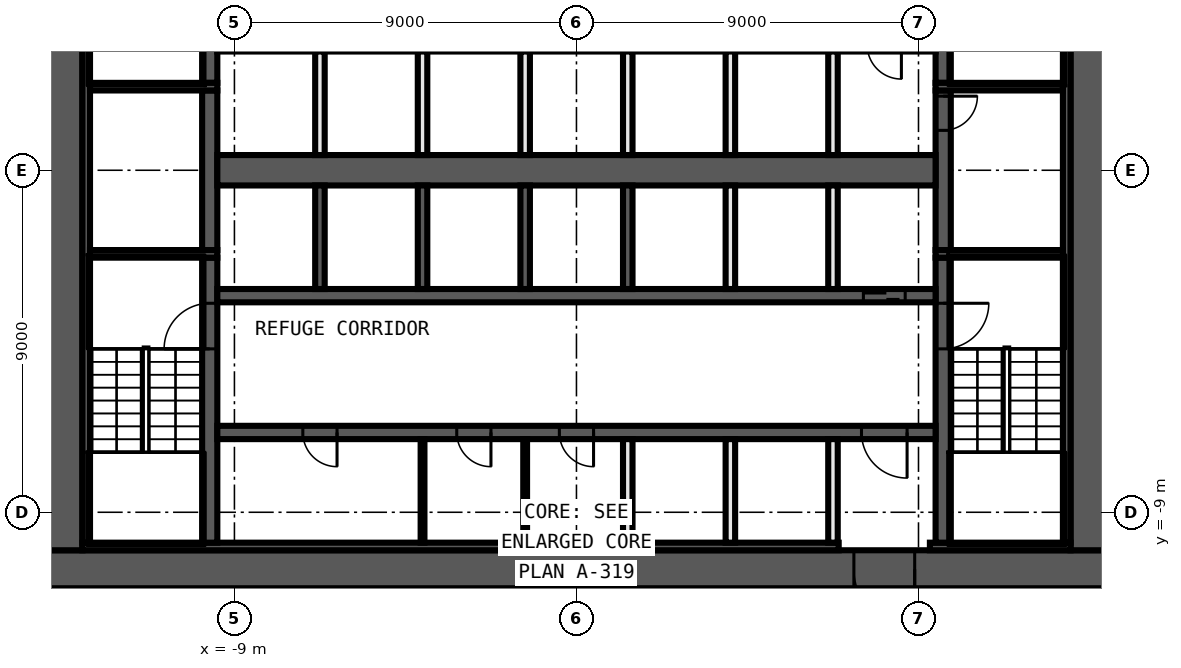
"""IFC4 building model, lengths in metres.
Left out: names, types, materials, properties, quantities, classifications, styles, units other than length and angle.
Written with IfcOpenShell. Run it as: python <this file> out.ifc"""

import sys

from ifc_helpers import new_model, si_unit, direction, frame, frame_2d, origin, place, context, subcontext, project, spatial, rectangle, extrude, element, fill, save


model = new_model("IFC4")
c1 = context("Model", 3, precision=1e-05, world=origin(), true_north=direction((0.0, 1.0)))
c2 = subcontext(c1, "Body", "Model", "MODEL_VIEW")
j1 = project(units=[si_unit("LENGTHUNIT", "METRE"), si_unit("PLANEANGLEUNIT", "RADIAN")], contexts=[c1])
p1 = place(None, origin())
s1 = spatial("IfcSite", under=j1, at=p1, CompositionType="ELEMENT")
p2 = place(p1, origin())
s2 = spatial("IfcBuilding", under=s1, at=p2, CompositionType="ELEMENT")
p3 = place(p2, frame((0.0, 0.0, 145.6)))
s3 = spatial("IfcBuildingStorey", under=s2, at=p3, CompositionType="ELEMENT", Elevation=145.6)
p4 = place(p3, frame((14.0, -10.5, 0.0), z_axis=(0.0, 0.0, 1.0), x_axis=(-1.0, 0.0, 0.0)))
e1 = element("IfcWall", 1, at=p4, inside=s3, PredefinedType="SHEAR", context=c2, shape_type="SweptSolid", body=[
    extrude(rectangle(XDim=28.0, YDim=1.0, at=frame_2d((14.0, 0.0))), origin(), (0.0, 0.0, 1.0), 5.55),
])
p5 = place(p4, frame((5.1, 0.0, 0.0)))
e2 = element("IfcOpeningElement", 2, at=p5, cuts=e1, PredefinedType="OPENING", context=c2, shape_type="SweptSolid", body=[
    extrude(rectangle(XDim=1.6, YDim=2.1, at=frame_2d((0.8, 1.05))), frame((0.0, 0.51, 0.0), z_axis=(0.0, -1.0, 0.0), x_axis=(1.0, 0.0, 0.0)), (0.0, 0.0, 1.0), 1.02),
])
for number, where, z_axis, x_axis in (
    (3, (13.5, 10.0, 0.0), (0.0, 0.0, 1.0), (0.0, -1.0, 0.0)),
    (4, (-13.5, -10.0, 0.0), (0.0, 0.0, 1.0), (0.0, 1.0, 0.0)),
):
    element("IfcWall", number, at=place(p3, frame(where, z_axis=z_axis, x_axis=x_axis)), inside=s3, PredefinedType="SHEAR", context=c2, shape_type="SweptSolid", body=[
        extrude(rectangle(XDim=20.0, YDim=1.0, at=frame_2d((10.0, 0.0))), origin(), (0.0, 0.0, 1.0), 5.55),
    ])
p6 = place(p3, frame((13.0, -9.9, 0.0), z_axis=(0.0, 0.0, 1.0), x_axis=(-1.0, 0.0, 0.0)))
e5 = element("IfcWall", 5, at=p6, inside=s3, PredefinedType="SHEAR", context=c2, shape_type="SweptSolid", body=[
    extrude(rectangle(XDim=3.7, YDim=0.2, at=frame_2d((1.85, 0.0))), origin(), (0.0, 0.0, 1.0), 5.55),
])
p7 = place(p3, frame((6.9, -9.9, 0.0), z_axis=(0.0, 0.0, 1.0), x_axis=(-1.0, 0.0, 0.0)))
e6 = element("IfcWall", 6, at=p7, inside=s3, PredefinedType="SHEAR", context=c2, shape_type="SweptSolid", body=[
    extrude(rectangle(XDim=19.9, YDim=0.2, at=frame_2d((9.95, 0.0))), origin(), (0.0, 0.0, 1.0), 5.55),
])
for number, where, z_axis, x_axis in (
    (7, (12.9, 9.8, 0.0), (0.0, 0.0, 1.0), (0.0, -1.0, 0.0)),
    (8, (-12.9, -9.8, 0.0), (0.0, 0.0, 1.0), (0.0, 1.0, 0.0)),
):
    element("IfcWall", number, at=place(p3, frame(where, z_axis=z_axis, x_axis=x_axis)), inside=s3, PredefinedType="SHEAR", context=c2, shape_type="SweptSolid", body=[
        extrude(rectangle(XDim=19.6, YDim=0.2, at=frame_2d((9.8, 0.0))), origin(), (0.0, 0.0, 1.0), 5.55),
    ])
p8 = place(p3, frame((9.65, -2.3, 0.0), z_axis=(0.0, 0.0, 1.0), x_axis=(0.0, -1.0, 0.0)))
e9 = element("IfcWall", 9, at=p8, inside=s3, PredefinedType="SHEAR", context=c2, shape_type="SweptSolid", body=[
    extrude(rectangle(XDim=7.5, YDim=0.4, at=frame_2d((3.75, 0.0))), origin(), (0.0, 0.0, 1.0), 5.55),
])
p9 = place(p8, frame((1.2, 0.0, 0.0)))
e10 = element("IfcOpeningElement", 10, at=p9, cuts=e9, PredefinedType="OPENING", context=c2, shape_type="SweptSolid", body=[
    extrude(rectangle(XDim=1.2, YDim=2.1, at=frame_2d((0.6, 1.05))), frame((0.0, 0.21, 0.0), z_axis=(0.0, -1.0, 0.0), x_axis=(1.0, 0.0, 0.0)), (0.0, 0.0, 1.0), 0.42),
])
p10 = place(p3, frame((9.65, 2.1, 0.0), z_axis=(0.0, 0.0, 1.0), x_axis=(0.0, -1.0, 0.0)))
e11 = element("IfcWall", 11, at=p10, inside=s3, PredefinedType="SHEAR", context=c2, shape_type="SweptSolid", body=[
    extrude(rectangle(XDim=4.2, YDim=0.4, at=frame_2d((2.1, 0.0))), origin(), (0.0, 0.0, 1.0), 5.55),
])
p11 = place(p10, frame((0.15, 0.0, 0.0)))
e12 = element("IfcOpeningElement", 12, at=p11, cuts=e11, PredefinedType="OPENING", context=c2, shape_type="SweptSolid", body=[
    extrude(rectangle(XDim=0.9, YDim=2.1, at=frame_2d((0.45, 1.05))), frame((0.0, 0.21, 0.0), z_axis=(0.0, -1.0, 0.0), x_axis=(1.0, 0.0, 0.0)), (0.0, 0.0, 1.0), 0.42),
])
p12 = place(p3, frame((9.65, 9.8, 0.0), z_axis=(0.0, 0.0, 1.0), x_axis=(0.0, -1.0, 0.0)))
e13 = element("IfcWall", 13, at=p12, inside=s3, PredefinedType="SHEAR", context=c2, shape_type="SweptSolid", body=[
    extrude(rectangle(XDim=7.5, YDim=0.4, at=frame_2d((3.75, 0.0))), origin(), (0.0, 0.0, 1.0), 5.55),
])
p13 = place(p12, frame((5.1, 0.0, 0.0)))
e14 = element("IfcOpeningElement", 14, at=p13, cuts=e13, PredefinedType="OPENING", context=c2, shape_type="SweptSolid", body=[
    extrude(rectangle(XDim=1.2, YDim=2.1, at=frame_2d((0.6, 1.05))), frame((0.0, 0.21, 0.0), z_axis=(0.0, -1.0, 0.0), x_axis=(1.0, 0.0, 0.0)), (0.0, 0.0, 1.0), 0.42),
])
p14 = place(p3, frame((-9.65, -9.8, 0.0), z_axis=(0.0, 0.0, 1.0), x_axis=(0.0, 1.0, 0.0)))
e15 = element("IfcWall", 15, at=p14, inside=s3, PredefinedType="SHEAR", context=c2, shape_type="SweptSolid", body=[
    extrude(rectangle(XDim=7.5, YDim=0.4, at=frame_2d((3.75, 0.0))), origin(), (0.0, 0.0, 1.0), 5.55),
])
p15 = place(p14, frame((5.1, 0.0, 0.0)))
e16 = element("IfcOpeningElement", 16, at=p15, cuts=e15, PredefinedType="OPENING", context=c2, shape_type="SweptSolid", body=[
    extrude(rectangle(XDim=1.2, YDim=2.1, at=frame_2d((0.6, 1.05))), frame((0.0, 0.21, 0.0), z_axis=(0.0, -1.0, 0.0), x_axis=(1.0, 0.0, 0.0)), (0.0, 0.0, 1.0), 0.42),
])
p16 = place(p3, frame((-9.65, -2.1, 0.0), z_axis=(0.0, 0.0, 1.0), x_axis=(0.0, 1.0, 0.0)))
e17 = element("IfcWall", 17, at=p16, inside=s3, PredefinedType="SHEAR", context=c2, shape_type="SweptSolid", body=[
    extrude(rectangle(XDim=4.2, YDim=0.4, at=frame_2d((2.1, 0.0))), origin(), (0.0, 0.0, 1.0), 5.55),
])
p17 = place(p3, frame((-9.65, 2.3, 0.0), z_axis=(0.0, 0.0, 1.0), x_axis=(0.0, 1.0, 0.0)))
e18 = element("IfcWall", 18, at=p17, inside=s3, PredefinedType="SHEAR", context=c2, shape_type="SweptSolid", body=[
    extrude(rectangle(XDim=7.5, YDim=0.4, at=frame_2d((3.75, 0.0))), origin(), (0.0, 0.0, 1.0), 5.55),
])
p18 = place(p17, frame((1.2, 0.0, 0.0)))
e19 = element("IfcOpeningElement", 19, at=p18, cuts=e18, PredefinedType="OPENING", context=c2, shape_type="SweptSolid", body=[
    extrude(rectangle(XDim=1.2, YDim=2.1, at=frame_2d((0.6, 1.05))), frame((0.0, 0.21, 0.0), z_axis=(0.0, -1.0, 0.0), x_axis=(1.0, 0.0, 0.0)), (0.0, 0.0, 1.0), 0.42),
])
for number, where, z_axis, x_axis in (
    (20, (9.45, 2.2, 0.0), (0.0, 0.0, 1.0), (1.0, 0.0, 0.0)),
    (21, (-9.45, 2.2, 0.0), (0.0, 0.0, 1.0), (-1.0, 0.0, 0.0)),
    (22, (9.45, -2.2, 0.0), (0.0, 0.0, 1.0), (1.0, 0.0, 0.0)),
    (23, (-9.45, -2.2, 0.0), (0.0, 0.0, 1.0), (-1.0, 0.0, 0.0)),
):
    element("IfcWall", number, at=place(p3, frame(where, z_axis=z_axis, x_axis=x_axis)), inside=s3, PredefinedType="SHEAR", context=c2, shape_type="SweptSolid", body=[
        extrude(rectangle(XDim=3.35, YDim=0.2, at=frame_2d((1.675, 0.0))), origin(), (0.0, 0.0, 1.0), 5.55),
    ])
p19 = place(p3, frame((-9.45, -3.3, 0.0), z_axis=(0.0, 0.0, 1.0), x_axis=(1.0, 0.0, 0.0)))
e24 = element("IfcWall", 24, at=p19, inside=s3, PredefinedType="SHEAR", context=c2, shape_type="SweptSolid", body=[
    extrude(rectangle(XDim=18.9, YDim=0.35, at=frame_2d((9.45, 0.0))), origin(), (0.0, 0.0, 1.0), 5.55),
])
p20 = place(p19, frame((17.0, 0.0, 0.0)))
e25 = element("IfcOpeningElement", 25, at=p20, cuts=e24, PredefinedType="OPENING", context=c2, shape_type="SweptSolid", body=[
    extrude(rectangle(XDim=1.1, YDim=2.1, at=frame_2d((0.55, 1.05))), frame((0.0, 0.185, 0.0), z_axis=(0.0, -1.0, 0.0), x_axis=(1.0, 0.0, 0.0)), (0.0, 0.0, 1.0), 0.37),
])
p21 = place(p3, frame((9.45, -6.9, 0.0), z_axis=(0.0, 0.0, 1.0), x_axis=(-1.0, 0.0, 0.0)))
e26 = element("IfcWall", 26, at=p21, inside=s3, PredefinedType="SHEAR", context=c2, shape_type="SweptSolid", body=[
    extrude(rectangle(XDim=18.9, YDim=0.35, at=frame_2d((9.45, 0.0))), origin(), (0.0, 0.0, 1.0), 5.55),
])
p22 = place(p21, frame((0.75, 0.0, 0.0)))
e27 = element("IfcOpeningElement", 27, at=p22, cuts=e26, PredefinedType="OPENING", context=c2, shape_type="SweptSolid", body=[
    extrude(rectangle(XDim=1.2, YDim=2.1, at=frame_2d((0.6, 1.05))), frame((0.0, 0.185, 0.0), z_axis=(0.0, -1.0, 0.0), x_axis=(1.0, 0.0, 0.0)), (0.0, 0.0, 1.0), 0.37),
])
p23 = place(p21, frame((15.75, 0.0, 0.0)))
e28 = element("IfcOpeningElement", 28, at=p23, cuts=e26, PredefinedType="OPENING", context=c2, shape_type="SweptSolid", body=[
    extrude(rectangle(XDim=0.9, YDim=2.1, at=frame_2d((0.45, 1.05))), frame((0.0, 0.185, 0.0), z_axis=(0.0, -1.0, 0.0), x_axis=(1.0, 0.0, 0.0)), (0.0, 0.0, 1.0), 0.37),
])
p24 = place(p21, frame((11.7, 0.0, 0.0)))
e29 = element("IfcOpeningElement", 29, at=p24, cuts=e26, PredefinedType="OPENING", context=c2, shape_type="SweptSolid", body=[
    extrude(rectangle(XDim=0.9, YDim=2.1, at=frame_2d((0.45, 1.05))), frame((0.0, 0.185, 0.0), z_axis=(0.0, -1.0, 0.0), x_axis=(1.0, 0.0, 0.0)), (0.0, 0.0, 1.0), 0.37),
])
p25 = place(p21, frame((9.0, 0.0, 0.0)))
e30 = element("IfcOpeningElement", 30, at=p25, cuts=e26, PredefinedType="OPENING", context=c2, shape_type="SweptSolid", body=[
    extrude(rectangle(XDim=0.9, YDim=2.1, at=frame_2d((0.45, 1.05))), frame((0.0, 0.185, 0.0), z_axis=(0.0, -1.0, 0.0), x_axis=(1.0, 0.0, 0.0)), (0.0, 0.0, 1.0), 0.37),
])
p26 = place(p3, frame((-9.45, 0.0, 0.0), z_axis=(0.0, 0.0, 1.0), x_axis=(1.0, 0.0, 0.0)))
e31 = element("IfcWall", 31, at=p26, inside=s3, PredefinedType="SHEAR", context=c2, shape_type="SweptSolid", body=[
    extrude(rectangle(XDim=18.9, YDim=0.8, at=frame_2d((9.45, 0.0))), origin(), (0.0, 0.0, 1.0), 5.55),
])
for number, where, z_axis, x_axis in (
    (32, (6.75, -9.8, 0.0), (0.0, 0.0, 1.0), (0.0, 1.0, 0.0)),
    (33, (6.75, -3.125, 0.0), (0.0, 0.0, 1.0), (0.0, 1.0, 0.0)),
    (34, (6.75, 0.4, 0.0), (0.0, 0.0, 1.0), (0.0, 1.0, 0.0)),
    (35, (4.05, -9.8, 0.0), (0.0, 0.0, 1.0), (0.0, 1.0, 0.0)),
    (36, (4.05, -3.125, 0.0), (0.0, 0.0, 1.0), (0.0, 1.0, 0.0)),
    (37, (4.05, 0.4, 0.0), (0.0, 0.0, 1.0), (0.0, 1.0, 0.0)),
):
    element("IfcWall", number, at=place(p3, frame(where, z_axis=z_axis, x_axis=x_axis)), inside=s3, PredefinedType="SOLIDWALL", context=c2, shape_type="SweptSolid", body=[
        extrude(rectangle(XDim=2.725, YDim=0.25, at=frame_2d((1.363, 0.0))), origin(), (0.0, 0.0, 1.0), 5.55),
    ])
p27 = place(p3, frame((1.35, -3.125, 0.0), z_axis=(0.0, 0.0, 1.0), x_axis=(0.0, 1.0, 0.0)))
e38 = element("IfcWall", 38, at=p27, inside=s3, PredefinedType="SHEAR", context=c2, shape_type="SweptSolid", body=[
    extrude(rectangle(XDim=2.725, YDim=0.25, at=frame_2d((1.363, 0.0))), origin(), (0.0, 0.0, 1.0), 5.55),
])
for number, where, z_axis, x_axis in (
    (39, (1.35, -9.8, 0.0), (0.0, 0.0, 1.0), (0.0, 1.0, 0.0)),
    (40, (1.35, 0.4, 0.0), (0.0, 0.0, 1.0), (0.0, 1.0, 0.0)),
):
    element("IfcWall", number, at=place(p3, frame(where, z_axis=z_axis, x_axis=x_axis)), inside=s3, PredefinedType="SOLIDWALL", context=c2, shape_type="SweptSolid", body=[
        extrude(rectangle(XDim=2.725, YDim=0.25, at=frame_2d((1.363, 0.0))), origin(), (0.0, 0.0, 1.0), 5.55),
    ])
p28 = place(p3, frame((-1.35, -9.8, 0.0), z_axis=(0.0, 0.0, 1.0), x_axis=(0.0, 1.0, 0.0)))
e41 = element("IfcWall", 41, at=p28, inside=s3, PredefinedType="PARTITIONING", context=c2, shape_type="SweptSolid", body=[
    extrude(rectangle(XDim=2.725, YDim=0.1, at=frame_2d((1.363, 0.0))), origin(), (0.0, 0.0, 1.0), 5.55),
])
p29 = place(p3, frame((-1.35, -3.125, 0.0), z_axis=(0.0, 0.0, 1.0), x_axis=(0.0, 1.0, 0.0)))
e42 = element("IfcWall", 42, at=p29, inside=s3, PredefinedType="SHEAR", context=c2, shape_type="SweptSolid", body=[
    extrude(rectangle(XDim=2.725, YDim=0.25, at=frame_2d((1.363, 0.0))), origin(), (0.0, 0.0, 1.0), 5.55),
])
p30 = place(p3, frame((-1.35, 0.4, 0.0), z_axis=(0.0, 0.0, 1.0), x_axis=(0.0, 1.0, 0.0)))
e43 = element("IfcWall", 43, at=p30, inside=s3, PredefinedType="SOLIDWALL", context=c2, shape_type="SweptSolid", body=[
    extrude(rectangle(XDim=2.725, YDim=0.25, at=frame_2d((1.363, 0.0))), origin(), (0.0, 0.0, 1.0), 5.55),
])
p31 = place(p3, frame((-4.05, -9.8, 0.0), z_axis=(0.0, 0.0, 1.0), x_axis=(0.0, 1.0, 0.0)))
e44 = element("IfcWall", 44, at=p31, inside=s3, PredefinedType="PARTITIONING", context=c2, shape_type="SweptSolid", body=[
    extrude(rectangle(XDim=2.725, YDim=0.1, at=frame_2d((1.363, 0.0))), origin(), (0.0, 0.0, 1.0), 5.55),
])
p32 = place(p3, frame((-4.05, -3.125, 0.0), z_axis=(0.0, 0.0, 1.0), x_axis=(0.0, 1.0, 0.0)))
e45 = element("IfcWall", 45, at=p32, inside=s3, PredefinedType="SHEAR", context=c2, shape_type="SweptSolid", body=[
    extrude(rectangle(XDim=2.725, YDim=0.25, at=frame_2d((1.363, 0.0))), origin(), (0.0, 0.0, 1.0), 5.55),
])
p33 = place(p3, frame((-4.05, 0.4, 0.0), z_axis=(0.0, 0.0, 1.0), x_axis=(0.0, 1.0, 0.0)))
e46 = element("IfcWall", 46, at=p33, inside=s3, PredefinedType="SOLIDWALL", context=c2, shape_type="SweptSolid", body=[
    extrude(rectangle(XDim=2.725, YDim=0.25, at=frame_2d((1.363, 0.0))), origin(), (0.0, 0.0, 1.0), 5.55),
])
p34 = place(p3, frame((-6.75, -3.125, 0.0), z_axis=(0.0, 0.0, 1.0), x_axis=(0.0, 1.0, 0.0)))
e47 = element("IfcWall", 47, at=p34, inside=s3, PredefinedType="SHEAR", context=c2, shape_type="SweptSolid", body=[
    extrude(rectangle(XDim=2.725, YDim=0.25, at=frame_2d((1.363, 0.0))), origin(), (0.0, 0.0, 1.0), 5.55),
])
p35 = place(p3, frame((-6.75, 0.4, 0.0), z_axis=(0.0, 0.0, 1.0), x_axis=(0.0, 1.0, 0.0)))
e48 = element("IfcWall", 48, at=p35, inside=s3, PredefinedType="SOLIDWALL", context=c2, shape_type="SweptSolid", body=[
    extrude(rectangle(XDim=2.725, YDim=0.25, at=frame_2d((1.363, 0.0))), origin(), (0.0, 0.0, 1.0), 5.55),
])
p36 = place(p11, origin())
e49 = element("IfcDoor", 49, at=p36, inside=s3, OperationType="SINGLE_SWING_RIGHT", PredefinedType="DOOR", context=c2, shape_type="SweptSolid", body=[
    extrude(rectangle(XDim=0.9, YDim=2.1, at=frame_2d((0.45, 1.05))), frame((0.0, 0.025, 0.0), z_axis=(0.0, -1.0, 0.0), x_axis=(1.0, 0.0, 0.0)), (0.0, 0.0, 1.0), 0.05),
])
fill(e12, e49)
p37 = place(p20, origin())
e50 = element("IfcDoor", 50, at=p37, inside=s3, OperationType="DOUBLE_DOOR_SLIDING", PredefinedType="DOOR", context=c2, shape_type="SweptSolid", body=[
    extrude(rectangle(XDim=1.1, YDim=2.1, at=frame_2d((0.55, 1.05))), frame((0.0, 0.025, 0.0), z_axis=(0.0, -1.0, 0.0), x_axis=(1.0, 0.0, 0.0)), (0.0, 0.0, 1.0), 0.05),
])
fill(e25, e50)
p38 = place(p5, origin())
e51 = element("IfcDoor", 51, at=p38, inside=s3, OperationType="DOUBLE_DOOR_SINGLE_SWING", PredefinedType="DOOR", context=c2, shape_type="SweptSolid", body=[
    extrude(rectangle(XDim=1.6, YDim=2.1, at=frame_2d((0.8, 1.05))), frame((0.0, 0.025, 0.0), z_axis=(0.0, -1.0, 0.0), x_axis=(1.0, 0.0, 0.0)), (0.0, 0.0, 1.0), 0.05),
])
fill(e2, e51)
p39 = place(p22, origin())
e52 = element("IfcDoor", 52, at=p39, inside=s3, OperationType="SINGLE_SWING_LEFT", PredefinedType="DOOR", context=c2, shape_type="SweptSolid", body=[
    extrude(rectangle(XDim=1.2, YDim=2.1, at=frame_2d((0.6, 1.05))), frame((0.0, 0.025, 0.0), z_axis=(0.0, -1.0, 0.0), x_axis=(1.0, 0.0, 0.0)), (0.0, 0.0, 1.0), 0.05),
])
fill(e27, e52)
p40 = place(p23, origin())
e53 = element("IfcDoor", 53, at=p40, inside=s3, OperationType="SINGLE_SWING_RIGHT", PredefinedType="DOOR", context=c2, shape_type="SweptSolid", body=[
    extrude(rectangle(XDim=0.9, YDim=2.1, at=frame_2d((0.45, 1.05))), frame((0.0, 0.025, 0.0), z_axis=(0.0, -1.0, 0.0), x_axis=(1.0, 0.0, 0.0)), (0.0, 0.0, 1.0), 0.05),
])
fill(e28, e53)
p41 = place(p24, origin())
e54 = element("IfcDoor", 54, at=p41, inside=s3, OperationType="SINGLE_SWING_LEFT", PredefinedType="DOOR", context=c2, shape_type="SweptSolid", body=[
    extrude(rectangle(XDim=0.9, YDim=2.1, at=frame_2d((0.45, 1.05))), frame((0.0, 0.025, 0.0), z_axis=(0.0, -1.0, 0.0), x_axis=(1.0, 0.0, 0.0)), (0.0, 0.0, 1.0), 0.05),
])
fill(e29, e54)
p42 = place(p25, origin())
e55 = element("IfcDoor", 55, at=p42, inside=s3, OperationType="SINGLE_SWING_RIGHT", PredefinedType="DOOR", context=c2, shape_type="SweptSolid", body=[
    extrude(rectangle(XDim=0.9, YDim=2.1, at=frame_2d((0.45, 1.05))), frame((0.0, 0.025, 0.0), z_axis=(0.0, -1.0, 0.0), x_axis=(1.0, 0.0, 0.0)), (0.0, 0.0, 1.0), 0.05),
])
fill(e30, e55)
p43 = place(p9, origin())
e56 = element("IfcDoor", 56, at=p43, inside=s3, OperationType="SINGLE_SWING_RIGHT", PredefinedType="DOOR", context=c2, shape_type="SweptSolid", body=[
    extrude(rectangle(XDim=1.2, YDim=2.1, at=frame_2d((0.6, 1.05))), frame((0.0, 0.025, 0.0), z_axis=(0.0, -1.0, 0.0), x_axis=(1.0, 0.0, 0.0)), (0.0, 0.0, 1.0), 0.05),
])
fill(e10, e56)
p44 = place(p15, origin())
e57 = element("IfcDoor", 57, at=p44, inside=s3, OperationType="SINGLE_SWING_LEFT", PredefinedType="DOOR", context=c2, shape_type="SweptSolid", body=[
    extrude(rectangle(XDim=1.2, YDim=2.1, at=frame_2d((0.6, 1.05))), frame((0.0, 0.025, 0.0), z_axis=(0.0, -1.0, 0.0), x_axis=(1.0, 0.0, 0.0)), (0.0, 0.0, 1.0), 0.05),
])
fill(e16, e57)
save(model, sys.argv[1])
